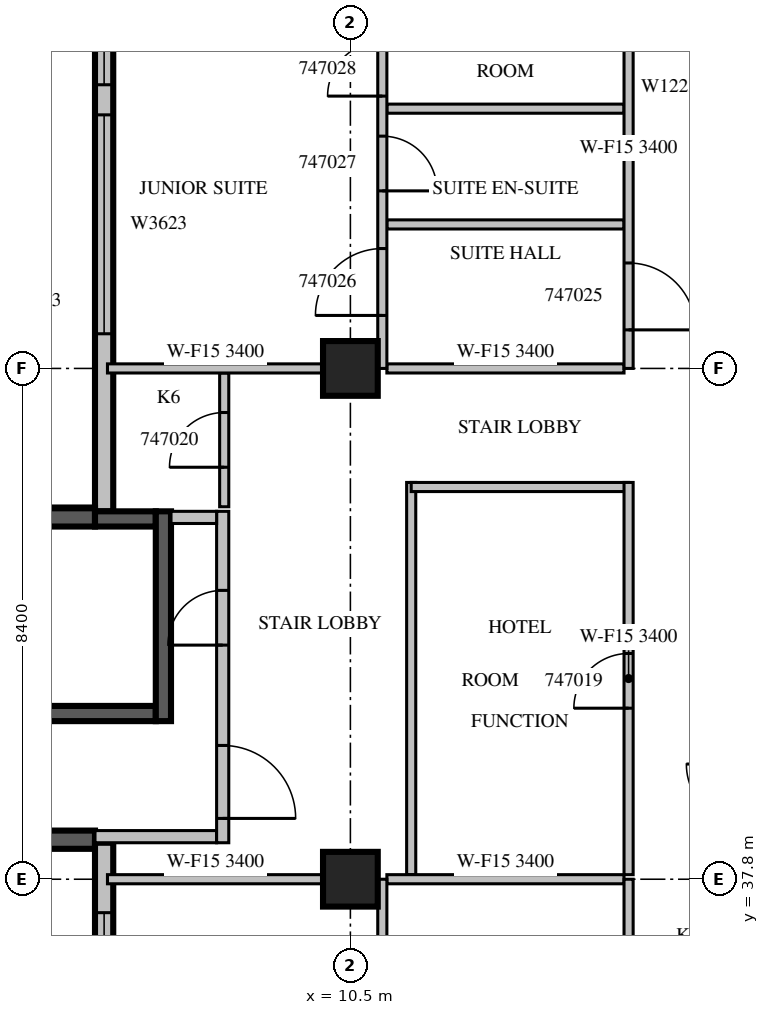
"""IFC4 building model, lengths in metres.
Left out: names, types, materials, properties, quantities, classifications, styles, units other than length and angle.
Written with IfcOpenShell. Run it as: python <this file> out.ifc"""

import sys

from ifc_helpers import new_model, si_unit, direction, frame, frame_2d, origin, origin_2d, place, context, subcontext, project, spatial, rectangle, extrude, source, transform, mapped, element, fill, save


model = new_model("IFC4")
c1 = context("Model", 3, precision=1e-05, world=origin(), true_north=direction((0.0, 1.0)))
c2 = subcontext(c1, "Body", "Model", "MODEL_VIEW")
j1 = project(units=[si_unit("LENGTHUNIT", "METRE"), si_unit("PLANEANGLEUNIT", "RADIAN")], contexts=[c1])
p1 = place(None, origin())
s1 = spatial("IfcSite", under=j1, at=p1, CompositionType="ELEMENT")
p2 = place(p1, origin())
s2 = spatial("IfcBuilding", under=s1, at=p2, CompositionType="ELEMENT")
p3 = place(p2, frame((0.0, 0.0, 212.0)))
s3 = spatial("IfcBuildingStorey", under=s2, at=p3, CompositionType="ELEMENT", Elevation=212.0)
m1 = source(origin(), c2, "Body", "SweptSolid", [
    extrude(rectangle(XDim=0.9, YDim=0.9, at=origin_2d()), origin(), (0.0, 0.0, 1.0), 3.8),
])
for number, where, z_axis, x_axis in (
    (1, (10.5, 37.8, 0.0), (0.0, 0.0, 1.0), (1.0, 0.0, 0.0)),
    (2, (10.5, 46.2, 0.0), (0.0, 0.0, 1.0), (1.0, 0.0, 0.0)),
):
    element("IfcColumn", number, at=place(p3, frame(where, z_axis=z_axis, x_axis=x_axis)), inside=s3, PredefinedType="COLUMN", context=c2, shape_type="MappedRepresentation", body=[
        mapped(m1, transform((0.0, 0.0, 0.0), scale=1.0)),
    ])
m2 = source(origin(), c2, "Body", "SweptSolid", [
    extrude(rectangle(XDim=9.91, YDim=0.3, at=frame_2d((4.955, 0.0))), origin(), (0.0, 0.0, 1.0), 3.4),
])
p4 = place(p3, frame((6.45, 53.76, 0.0), z_axis=(0.0, 0.0, 1.0), x_axis=(0.0, -1.0, 0.0)))
e3 = element("IfcWall", 3, at=p4, inside=s3, PredefinedType="STANDARD", context=c2, shape_type="MappedRepresentation", body=[
    mapped(m2, transform((0.0, 0.0, 0.0), scale=1.0)),
])
m3 = source(origin(), c2, "Body", "SweptSolid", [
    extrude(rectangle(XDim=3.6, YDim=2.3, at=frame_2d((1.8, 1.15))), frame((0.0, 0.16, 0.0), z_axis=(0.0, -1.0, 0.0), x_axis=(1.0, 0.0, 0.0)), (0.0, 0.0, 1.0), 0.32),
])
p5 = place(p4, frame((3.39, 0.0, 0.6)))
e4 = element("IfcOpeningElement", 4, at=p5, cuts=e3, PredefinedType="OPENING", context=c2, shape_type="MappedRepresentation", body=[
    mapped(m3, transform((0.0, 0.0, 0.0), scale=1.0)),
])
m4 = source(origin(), c2, "Body", "SweptSolid", [
    extrude(rectangle(XDim=2.4, YDim=2.3, at=frame_2d((1.2, 1.15))), frame((0.0, 0.16, 0.0), z_axis=(0.0, -1.0, 0.0), x_axis=(1.0, 0.0, 0.0)), (0.0, 0.0, 1.0), 0.32),
])
p6 = place(p4, frame((0.495, 0.0, 0.6)))
e5 = element("IfcOpeningElement", 5, at=p6, cuts=e3, PredefinedType="OPENING", context=c2, shape_type="MappedRepresentation", body=[
    mapped(m4, transform((0.0, 0.0, 0.0), scale=1.0)),
])
m5 = source(origin(), c2, "Body", "SweptSolid", [
    extrude(rectangle(XDim=6.1, YDim=0.3, at=frame_2d((3.05, 0.0))), origin(), (0.0, 0.0, 1.0), 3.4),
])
for number, where, z_axis, x_axis in (
    (6, (6.3, 43.75, 0.0), (0.0, 0.0, 1.0), (-1.0, 0.0, 0.0)),
    (7, (0.2, 38.45, 0.0), (0.0, 0.0, 1.0), (1.0, 0.0, 0.0)),
):
    element("IfcWall", number, at=place(p3, frame(where, z_axis=z_axis, x_axis=x_axis)), inside=s3, PredefinedType="SOLIDWALL", context=c2, shape_type="MappedRepresentation", body=[
        mapped(m5, transform((0.0, 0.0, 0.0), scale=1.0)),
    ])
m6 = source(origin(), c2, "Body", "SweptSolid", [
    extrude(rectangle(XDim=16.6, YDim=0.3, at=frame_2d((8.3, 0.0))), origin(), (0.0, 0.0, 1.0), 3.4),
])
p7 = place(p3, frame((6.45, 38.4, 0.0), z_axis=(0.0, 0.0, 1.0), x_axis=(0.0, -1.0, 0.0)))
e8 = element("IfcWall", 8, at=p7, inside=s3, PredefinedType="STANDARD", context=c2, shape_type="MappedRepresentation", body=[
    mapped(m6, transform((0.0, 0.0, 0.0), scale=1.0)),
])
m7 = source(origin(), c2, "Body", "SweptSolid", [
    extrude(rectangle(XDim=1.8, YDim=2.3, at=frame_2d((0.9, 1.15))), frame((0.0, 0.16, 0.0), z_axis=(0.0, -1.0, 0.0), x_axis=(1.0, 0.0, 0.0)), (0.0, 0.0, 1.0), 0.32),
])
p8 = place(p7, frame((1.15, 0.0, 0.6)))
e9 = element("IfcOpeningElement", 9, at=p8, cuts=e8, PredefinedType="OPENING", context=c2, shape_type="MappedRepresentation", body=[
    mapped(m7, transform((0.0, 0.0, 0.0), scale=1.0)),
])
p9 = place(p7, frame((9.438, 0.0, 0.6)))
e10 = element("IfcOpeningElement", 10, at=p9, cuts=e8, PredefinedType="OPENING", context=c2, shape_type="MappedRepresentation", body=[
    mapped(m7, transform((0.0, 0.0, 0.0), scale=1.0)),
])
m8 = source(origin(), c2, "Body", "SweptSolid", [
    extrude(rectangle(XDim=1.2, YDim=2.3, at=frame_2d((0.6, 1.15))), frame((0.0, 0.16, 0.0), z_axis=(0.0, -1.0, 0.0), x_axis=(1.0, 0.0, 0.0)), (0.0, 0.0, 1.0), 0.32),
])
p10 = place(p7, frame((14.338, 0.0, 0.6)))
e11 = element("IfcOpeningElement", 11, at=p10, cuts=e8, PredefinedType="OPENING", context=c2, shape_type="MappedRepresentation", body=[
    mapped(m8, transform((0.0, 0.0, 0.0), scale=1.0)),
])
p11 = place(p7, frame((11.887, 0.0, 0.6)))
e12 = element("IfcOpeningElement", 12, at=p11, cuts=e8, PredefinedType="OPENING", context=c2, shape_type="MappedRepresentation", body=[
    mapped(m7, transform((0.0, 0.0, 0.0), scale=1.0)),
])
m9 = source(origin(), c2, "Body", "SweptSolid", [
    extrude(rectangle(XDim=1.0, YDim=2.1, at=frame_2d((0.5, 1.05))), frame((0.0, 0.16, 0.0), z_axis=(0.0, -1.0, 0.0), x_axis=(1.0, 0.0, 0.0)), (0.0, 0.0, 1.0), 0.32),
])
p12 = place(p7, frame((5.45, 0.0, 0.0)))
e13 = element("IfcOpeningElement", 13, at=p12, cuts=e8, PredefinedType="OPENING", context=c2, shape_type="MappedRepresentation", body=[
    mapped(m9, transform((0.0, 0.0, 0.0), scale=1.0)),
])
m10 = source(origin(), c2, "Body", "SweptSolid", [
    extrude(rectangle(XDim=7.0, YDim=0.25, at=frame_2d((3.5, 0.0))), origin(), (0.0, 0.0, 1.0), 3.4),
])
p13 = place(p3, frame((0.3, 40.525, 0.0), z_axis=(0.0, 0.0, 1.0), x_axis=(1.0, 0.0, 0.0)))
e14 = element("IfcWall", 14, at=p13, inside=s3, PredefinedType="SOLIDWALL", context=c2, shape_type="MappedRepresentation", body=[
    mapped(m10, transform((0.0, 0.0, 0.0), scale=1.0)),
])
m11 = source(origin(), c2, "Body", "SweptSolid", [
    extrude(rectangle(XDim=1.1, YDim=2.1, at=frame_2d((0.55, 1.05))), frame((0.0, 0.135, 0.0), z_axis=(0.0, -1.0, 0.0), x_axis=(1.0, 0.0, 0.0)), (0.0, 0.0, 1.0), 0.27),
])
p14 = place(p13, frame((0.55, 0.0, 0.0)))
e15 = element("IfcOpeningElement", 15, at=p14, cuts=e14, PredefinedType="OPENING", context=c2, shape_type="MappedRepresentation", body=[
    mapped(m11, transform((0.0, 0.0, 0.0), scale=1.0)),
])
m12 = source(origin(), c2, "Body", "SweptSolid", [
    extrude(rectangle(XDim=1.0, YDim=0.25, at=frame_2d((0.5, 0.0))), origin(), (0.0, 0.0, 1.0), 3.4),
])
p15 = place(p3, frame((6.3, 43.725, 0.0), z_axis=(0.0, 0.0, 1.0), x_axis=(1.0, 0.0, 0.0)))
e16 = element("IfcWall", 16, at=p15, inside=s3, PredefinedType="SOLIDWALL", context=c2, shape_type="MappedRepresentation", body=[
    mapped(m12, transform((0.0, 0.0, 0.0), scale=1.0)),
])
m13 = source(origin(), c2, "Body", "SweptSolid", [
    extrude(rectangle(XDim=3.45, YDim=0.25, at=frame_2d((1.725, 0.0))), origin(), (0.0, 0.0, 1.0), 3.4),
])
p16 = place(p3, frame((7.425, 40.4, 0.0), z_axis=(0.0, 0.0, 1.0), x_axis=(0.0, 1.0, 0.0)))
e17 = element("IfcWall", 17, at=p16, inside=s3, PredefinedType="SOLIDWALL", context=c2, shape_type="MappedRepresentation", body=[
    mapped(m13, transform((0.0, 0.0, 0.0), scale=1.0)),
])
m14 = source(origin(), c2, "Body", "SweptSolid", [
    extrude(rectangle(XDim=2.0, YDim=0.2, at=frame_2d((1.0, 0.0))), origin(), (0.0, 0.0, 1.0), 3.4),
])
p17 = place(p3, frame((6.3, 38.5, 0.0), z_axis=(0.0, 0.0, 1.0), x_axis=(1.0, 0.0, 0.0)))
e18 = element("IfcWall", 18, at=p17, inside=s3, PredefinedType="PARTITIONING", context=c2, shape_type="MappedRepresentation", body=[
    mapped(m14, transform((0.0, 0.0, 0.0), scale=1.0)),
])
m15 = source(origin(), c2, "Body", "SweptSolid", [
    extrude(rectangle(XDim=5.45, YDim=0.2, at=frame_2d((2.725, 0.0))), origin(), (0.0, 0.0, 1.0), 3.4),
])
p18 = place(p3, frame((8.4, 38.4, 0.0), z_axis=(0.0, 0.0, 1.0), x_axis=(0.0, 1.0, 0.0)))
e19 = element("IfcWall", 19, at=p18, inside=s3, PredefinedType="PARTITIONING", context=c2, shape_type="MappedRepresentation", body=[
    mapped(m15, transform((0.0, 0.0, 0.0), scale=1.0)),
])
m16 = source(origin(), c2, "Body", "SweptSolid", [
    extrude(rectangle(XDim=1.2, YDim=2.1, at=frame_2d((0.6, 1.05))), frame((0.0, 0.11, 0.0), z_axis=(0.0, -1.0, 0.0), x_axis=(1.0, 0.0, 0.0)), (0.0, 0.0, 1.0), 0.22),
])
p19 = place(p18, frame((0.4, 0.0, 0.0)))
e20 = element("IfcOpeningElement", 20, at=p19, cuts=e19, PredefinedType="OPENING", context=c2, shape_type="MappedRepresentation", body=[
    mapped(m16, transform((0.0, 0.0, 0.0), scale=1.0)),
])
m17 = source(origin(), c2, "Body", "SweptSolid", [
    extrude(rectangle(XDim=0.9, YDim=2.1, at=frame_2d((0.45, 1.05))), frame((0.0, 0.11, 0.0), z_axis=(0.0, -1.0, 0.0), x_axis=(1.0, 0.0, 0.0)), (0.0, 0.0, 1.0), 0.22),
])
p20 = place(p18, frame((3.25, 0.0, 0.0)))
e21 = element("IfcOpeningElement", 21, at=p20, cuts=e19, PredefinedType="OPENING", context=c2, shape_type="MappedRepresentation", body=[
    mapped(m17, transform((0.0, 0.0, 0.0), scale=1.0)),
])
m18 = source(origin(), c2, "Body", "SweptSolid", [
    extrude(rectangle(XDim=0.75, YDim=0.2, at=frame_2d((0.375, 0.0))), origin(), (0.0, 0.0, 1.0), 3.4),
])
p21 = place(p3, frame((7.55, 43.75, 0.0), z_axis=(0.0, 0.0, 1.0), x_axis=(1.0, 0.0, 0.0)))
e22 = element("IfcWall", 22, at=p21, inside=s3, PredefinedType="PARTITIONING", context=c2, shape_type="MappedRepresentation", body=[
    mapped(m18, transform((0.0, 0.0, 0.0), scale=1.0)),
])
m19 = source(origin(), c2, "Body", "SweptSolid", [
    extrude(rectangle(XDim=6.45, YDim=0.15, at=frame_2d((3.225, 0.0))), origin(), (0.0, 0.0, 1.0), 3.4),
])
p22 = place(p3, frame((11.5, 44.325, 0.0), z_axis=(0.0, 0.0, 1.0), x_axis=(0.0, -1.0, 0.0)))
e23 = element("IfcWall", 23, at=p22, inside=s3, PredefinedType="PARTITIONING", context=c2, shape_type="MappedRepresentation", body=[
    mapped(m19, transform((0.0, 0.0, 0.0), scale=1.0)),
])
m20 = source(origin(), c2, "Body", "SweptSolid", [
    extrude(rectangle(XDim=3.575, YDim=0.15, at=frame_2d((1.788, 0.0))), origin(), (0.0, 0.0, 1.0), 3.4),
])
p23 = place(p3, frame((15.075, 44.25, 0.0), z_axis=(0.0, 0.0, 1.0), x_axis=(-1.0, 0.0, 0.0)))
e24 = element("IfcWall", 24, at=p23, inside=s3, PredefinedType="PARTITIONING", context=c2, shape_type="MappedRepresentation", body=[
    mapped(m20, transform((0.0, 0.0, 0.0), scale=1.0)),
])
p24 = place(p3, frame((15.075, 37.875, 0.0), z_axis=(0.0, 0.0, 1.0), x_axis=(0.0, 1.0, 0.0)))
e25 = element("IfcWall", 25, at=p24, inside=s3, PredefinedType="PARTITIONING", context=c2, shape_type="MappedRepresentation", body=[
    mapped(m19, transform((0.0, 0.0, 0.0), scale=1.0)),
])
m21 = source(origin(), c2, "Body", "SweptSolid", [
    extrude(rectangle(XDim=0.9, YDim=2.1, at=frame_2d((0.45, 1.05))), frame((0.0, 0.085, 0.0), z_axis=(0.0, -1.0, 0.0), x_axis=(1.0, 0.0, 0.0)), (0.0, 0.0, 1.0), 0.17),
])
p25 = place(p24, frame((2.737, 0.0, 0.0)))
e26 = element("IfcOpeningElement", 26, at=p25, cuts=e25, PredefinedType="OPENING", context=c2, shape_type="MappedRepresentation", body=[
    mapped(m21, transform((0.0, 0.0, 0.0), scale=1.0)),
])
m22 = source(origin(), c2, "Body", "SweptSolid", [
    extrude(rectangle(XDim=2.2, YDim=0.15, at=frame_2d((1.1, 0.0))), origin(), (0.0, 0.0, 1.0), 3.4),
])
p26 = place(p3, frame((8.425, 43.925, 0.0), z_axis=(0.0, 0.0, 1.0), x_axis=(0.0, 1.0, 0.0)))
e27 = element("IfcWall", 27, at=p26, inside=s3, PredefinedType="PARTITIONING", context=c2, shape_type="MappedRepresentation", body=[
    mapped(m22, transform((0.0, 0.0, 0.0), scale=1.0)),
])
p27 = place(p26, frame((0.65, 0.0, 0.0)))
e28 = element("IfcOpeningElement", 28, at=p27, cuts=e27, PredefinedType="OPENING", context=c2, shape_type="MappedRepresentation", body=[
    mapped(m21, transform((0.0, 0.0, 0.0), scale=1.0)),
])
m23 = source(origin(), c2, "Body", "SweptSolid", [
    extrude(rectangle(XDim=3.546, YDim=0.15, at=frame_2d((1.773, 0.0))), origin(), (0.0, 0.0, 1.0), 3.4),
])
p28 = place(p3, frame((10.051, 37.8, 0.0), z_axis=(0.0, 0.0, 1.0), x_axis=(-1.0, 0.0, 0.0)))
e29 = element("IfcWall", 29, at=p28, inside=s3, PredefinedType="PARTITIONING", context=c2, shape_type="MappedRepresentation", body=[
    mapped(m23, transform((0.0, 0.0, 0.0), scale=1.0)),
])
m24 = source(origin(), c2, "Body", "SweptSolid", [
    extrude(rectangle(XDim=3.9, YDim=0.15, at=frame_2d((1.95, 0.0))), origin(), (0.0, 0.0, 1.0), 3.4),
])
p29 = place(p3, frame((15.0, 37.8, 0.0), z_axis=(0.0, 0.0, 1.0), x_axis=(-1.0, 0.0, 0.0)))
e30 = element("IfcWall", 30, at=p29, inside=s3, PredefinedType="PARTITIONING", context=c2, shape_type="MappedRepresentation", body=[
    mapped(m24, transform((0.0, 0.0, 0.0), scale=1.0)),
])
m25 = source(origin(), c2, "Body", "SweptSolid", [
    extrude(rectangle(XDim=8.4, YDim=0.15, at=frame_2d((4.2, 0.0))), origin(), (0.0, 0.0, 1.0), 3.4),
])
p30 = place(p3, frame((11.025, 29.4, 0.0), z_axis=(0.0, 0.0, 1.0), x_axis=(0.0, 1.0, 0.0)))
e31 = element("IfcWall", 31, at=p30, inside=s3, PredefinedType="PARTITIONING", context=c2, shape_type="MappedRepresentation", body=[
    mapped(m25, transform((0.0, 0.0, 0.0), scale=1.0)),
])
m26 = source(origin(), c2, "Body", "SweptSolid", [
    extrude(rectangle(XDim=1.1, YDim=2.1, at=frame_2d((0.55, 1.05))), frame((0.0, 0.085, 0.0), z_axis=(0.0, -1.0, 0.0), x_axis=(1.0, 0.0, 0.0)), (0.0, 0.0, 1.0), 0.17),
])
p31 = place(p30, frame((0.876, 0.0, 0.0)))
e32 = element("IfcOpeningElement", 32, at=p31, cuts=e31, PredefinedType="OPENING", context=c2, shape_type="MappedRepresentation", body=[
    mapped(m26, transform((0.0, 0.0, 0.0), scale=1.0)),
])
p32 = place(p30, frame((3.38, 0.0, 0.0)))
e33 = element("IfcOpeningElement", 33, at=p32, cuts=e31, PredefinedType="OPENING", context=c2, shape_type="MappedRepresentation", body=[
    mapped(m21, transform((0.0, 0.0, 0.0), scale=1.0)),
])
p33 = place(p30, frame((6.154, 0.0, 0.0)))
e34 = element("IfcOpeningElement", 34, at=p33, cuts=e31, PredefinedType="OPENING", context=c2, shape_type="MappedRepresentation", body=[
    mapped(m21, transform((0.0, 0.0, 0.0), scale=1.0)),
])
for number, where, z_axis, x_axis in (
    (35, (15.0, 48.568, 0.0), (0.0, 0.0, 1.0), (-1.0, 0.0, 0.0)),
    (36, (15.0, 50.472, 0.0), (0.0, 0.0, 1.0), (-1.0, 0.0, 0.0)),
):
    element("IfcWall", number, at=place(p3, frame(where, z_axis=z_axis, x_axis=x_axis)), inside=s3, PredefinedType="PARTITIONING", context=c2, shape_type="MappedRepresentation", body=[
        mapped(m24, transform((0.0, 0.0, 0.0), scale=1.0)),
    ])
p34 = place(p3, frame((10.051, 46.2, 0.0), z_axis=(0.0, 0.0, 1.0), x_axis=(-1.0, 0.0, 0.0)))
e37 = element("IfcWall", 37, at=p34, inside=s3, PredefinedType="PARTITIONING", context=c2, shape_type="MappedRepresentation", body=[
    mapped(m23, transform((0.0, 0.0, 0.0), scale=1.0)),
])
p35 = place(p3, frame((15.0, 46.2, 0.0), z_axis=(0.0, 0.0, 1.0), x_axis=(-1.0, 0.0, 0.0)))
e38 = element("IfcWall", 38, at=p35, inside=s3, PredefinedType="PARTITIONING", context=c2, shape_type="MappedRepresentation", body=[
    mapped(m24, transform((0.0, 0.0, 0.0), scale=1.0)),
])
m27 = source(origin(), c2, "Body", "SweptSolid", [
    extrude(rectangle(XDim=7.26, YDim=0.15, at=frame_2d((3.63, 0.0))), origin(), (0.0, 0.0, 1.0), 3.4),
])
p36 = place(p3, frame((11.025, 46.2, 0.0), z_axis=(0.0, 0.0, 1.0), x_axis=(0.0, 1.0, 0.0)))
e39 = element("IfcWall", 39, at=p36, inside=s3, PredefinedType="PARTITIONING", context=c2, shape_type="MappedRepresentation", body=[
    mapped(m27, transform((0.0, 0.0, 0.0), scale=1.0)),
])
p37 = place(p36, frame((0.872, 0.0, 0.0)))
e40 = element("IfcOpeningElement", 40, at=p37, cuts=e39, PredefinedType="OPENING", context=c2, shape_type="MappedRepresentation", body=[
    mapped(m26, transform((0.0, 0.0, 0.0), scale=1.0)),
])
p38 = place(p36, frame((2.92, 0.0, 0.0)))
e41 = element("IfcOpeningElement", 41, at=p38, cuts=e39, PredefinedType="OPENING", context=c2, shape_type="MappedRepresentation", body=[
    mapped(m21, transform((0.0, 0.0, 0.0), scale=1.0)),
])
p39 = place(p36, frame((4.478, 0.0, 0.0)))
e42 = element("IfcOpeningElement", 42, at=p39, cuts=e39, PredefinedType="OPENING", context=c2, shape_type="MappedRepresentation", body=[
    mapped(m21, transform((0.0, 0.0, 0.0), scale=1.0)),
])
p40 = place(p3, frame((15.075, 29.4, 0.0), z_axis=(0.0, 0.0, 1.0), x_axis=(0.0, 1.0, 0.0)))
e43 = element("IfcWall", 43, at=p40, inside=s3, PredefinedType="PARTITIONING", context=c2, shape_type="MappedRepresentation", body=[
    mapped(m25, transform((0.0, 0.0, 0.0), scale=1.0)),
])
p41 = place(p40, frame((0.638, 0.0, 0.0)))
e44 = element("IfcOpeningElement", 44, at=p41, cuts=e43, PredefinedType="OPENING", context=c2, shape_type="MappedRepresentation", body=[
    mapped(m26, transform((0.0, 0.0, 0.0), scale=1.0)),
])
p42 = place(p3, frame((15.075, 46.2, 0.0), z_axis=(0.0, 0.0, 1.0), x_axis=(0.0, 1.0, 0.0)))
e45 = element("IfcWall", 45, at=p42, inside=s3, PredefinedType="PARTITIONING", context=c2, shape_type="MappedRepresentation", body=[
    mapped(m27, transform((0.0, 0.0, 0.0), scale=1.0)),
])
p43 = place(p42, frame((0.634, 0.0, 0.0)))
e46 = element("IfcOpeningElement", 46, at=p43, cuts=e45, PredefinedType="OPENING", context=c2, shape_type="MappedRepresentation", body=[
    mapped(m26, transform((0.0, 0.0, 0.0), scale=1.0)),
])
m28 = source(origin(), c2, "Body", "SweptSolid", [
    extrude(rectangle(XDim=3.6, YDim=2.3, at=frame_2d((1.8, 1.15))), frame((0.0, 0.03, 0.0), z_axis=(0.0, -1.0, 0.0), x_axis=(1.0, 0.0, 0.0)), (0.0, 0.0, 1.0), 0.06),
])
p44 = place(p5, origin())
e47 = element("IfcWindow", 47, at=p44, inside=s3, PartitioningType="SINGLE_PANEL", PredefinedType="WINDOW", context=c2, shape_type="MappedRepresentation", body=[
    mapped(m28, transform((0.0, 0.0, 0.0), scale=1.0)),
])
fill(e4, e47)
m29 = source(origin(), c2, "Body", "SweptSolid", [
    extrude(rectangle(XDim=2.4, YDim=2.3, at=frame_2d((1.2, 1.15))), frame((0.0, 0.03, 0.0), z_axis=(0.0, -1.0, 0.0), x_axis=(1.0, 0.0, 0.0)), (0.0, 0.0, 1.0), 0.06),
])
p45 = place(p6, origin())
e48 = element("IfcWindow", 48, at=p45, inside=s3, PartitioningType="SINGLE_PANEL", PredefinedType="WINDOW", context=c2, shape_type="MappedRepresentation", body=[
    mapped(m29, transform((0.0, 0.0, 0.0), scale=1.0)),
])
fill(e5, e48)
m30 = source(origin(), c2, "Body", "SweptSolid", [
    extrude(rectangle(XDim=1.8, YDim=2.3, at=frame_2d((0.9, 1.15))), frame((0.0, 0.03, 0.0), z_axis=(0.0, -1.0, 0.0), x_axis=(1.0, 0.0, 0.0)), (0.0, 0.0, 1.0), 0.06),
])
p46 = place(p8, origin())
e49 = element("IfcWindow", 49, at=p46, inside=s3, PartitioningType="SINGLE_PANEL", PredefinedType="WINDOW", context=c2, shape_type="MappedRepresentation", body=[
    mapped(m30, transform((0.0, 0.0, 0.0), scale=1.0)),
])
fill(e9, e49)
m31 = source(origin(), c2, "Body", "SweptSolid", [
    extrude(rectangle(XDim=1.2, YDim=2.1, at=frame_2d((0.6, 1.05))), frame((0.0, 0.025, 0.0), z_axis=(0.0, -1.0, 0.0), x_axis=(1.0, 0.0, 0.0)), (0.0, 0.0, 1.0), 0.05),
])
p47 = place(p19, origin())
e50 = element("IfcDoor", 50, at=p47, inside=s3, OperationType="SINGLE_SWING_RIGHT", PredefinedType="DOOR", context=c2, shape_type="MappedRepresentation", body=[
    mapped(m31, transform((0.0, 0.0, 0.0), scale=1.0)),
])
fill(e20, e50)
m32 = source(origin(), c2, "Body", "SweptSolid", [
    extrude(rectangle(XDim=0.9, YDim=2.1, at=frame_2d((0.45, 1.05))), frame((0.0, 0.025, 0.0), z_axis=(0.0, -1.0, 0.0), x_axis=(1.0, 0.0, 0.0)), (0.0, 0.0, 1.0), 0.05),
])
p48 = place(p20, origin())
e51 = element("IfcDoor", 51, at=p48, inside=s3, OperationType="SINGLE_SWING_LEFT", PredefinedType="DOOR", context=c2, shape_type="MappedRepresentation", body=[
    mapped(m32, transform((0.0, 0.0, 0.0), scale=1.0)),
])
fill(e21, e51)
p49 = place(p25, origin())
e52 = element("IfcDoor", 52, at=p49, inside=s3, OperationType="SINGLE_SWING_LEFT", PredefinedType="DOOR", context=c2, shape_type="MappedRepresentation", body=[
    mapped(m32, transform((0.0, 0.0, 0.0), scale=1.0)),
])
fill(e26, e52)
p50 = place(p27, origin())
e53 = element("IfcDoor", 53, at=p50, inside=s3, OperationType="SINGLE_SWING_LEFT", PredefinedType="DOOR", context=c2, shape_type="MappedRepresentation", body=[
    mapped(m32, transform((0.0, 0.0, 0.0), scale=1.0)),
])
fill(e28, e53)
m33 = source(origin(), c2, "Body", "SweptSolid", [
    extrude(rectangle(XDim=1.1, YDim=2.1, at=frame_2d((0.55, 1.05))), frame((0.0, 0.025, 0.0), z_axis=(0.0, -1.0, 0.0), x_axis=(1.0, 0.0, 0.0)), (0.0, 0.0, 1.0), 0.05),
])
p51 = place(p43, origin())
e54 = element("IfcDoor", 54, at=p51, inside=s3, OperationType="SINGLE_SWING_RIGHT", PredefinedType="DOOR", context=c2, shape_type="MappedRepresentation", body=[
    mapped(m33, transform((0.0, 0.0, 0.0), scale=1.0)),
])
fill(e46, e54)
p52 = place(p37, origin())
e55 = element("IfcDoor", 55, at=p52, inside=s3, OperationType="SINGLE_SWING_LEFT", PredefinedType="DOOR", context=c2, shape_type="MappedRepresentation", body=[
    mapped(m33, transform((0.0, 0.0, 0.0), scale=1.0)),
])
fill(e40, e55)
p53 = place(p38, origin())
e56 = element("IfcDoor", 56, at=p53, inside=s3, OperationType="SINGLE_SWING_RIGHT", PredefinedType="DOOR", context=c2, shape_type="MappedRepresentation", body=[
    mapped(m32, transform((0.0, 0.0, 0.0), scale=1.0)),
])
fill(e41, e56)
p54 = place(p39, origin())
e57 = element("IfcDoor", 57, at=p54, inside=s3, OperationType="SINGLE_SWING_LEFT", PredefinedType="DOOR", context=c2, shape_type="MappedRepresentation", body=[
    mapped(m32, transform((0.0, 0.0, 0.0), scale=1.0)),
])
fill(e42, e57)
save(model, sys.argv[1])
